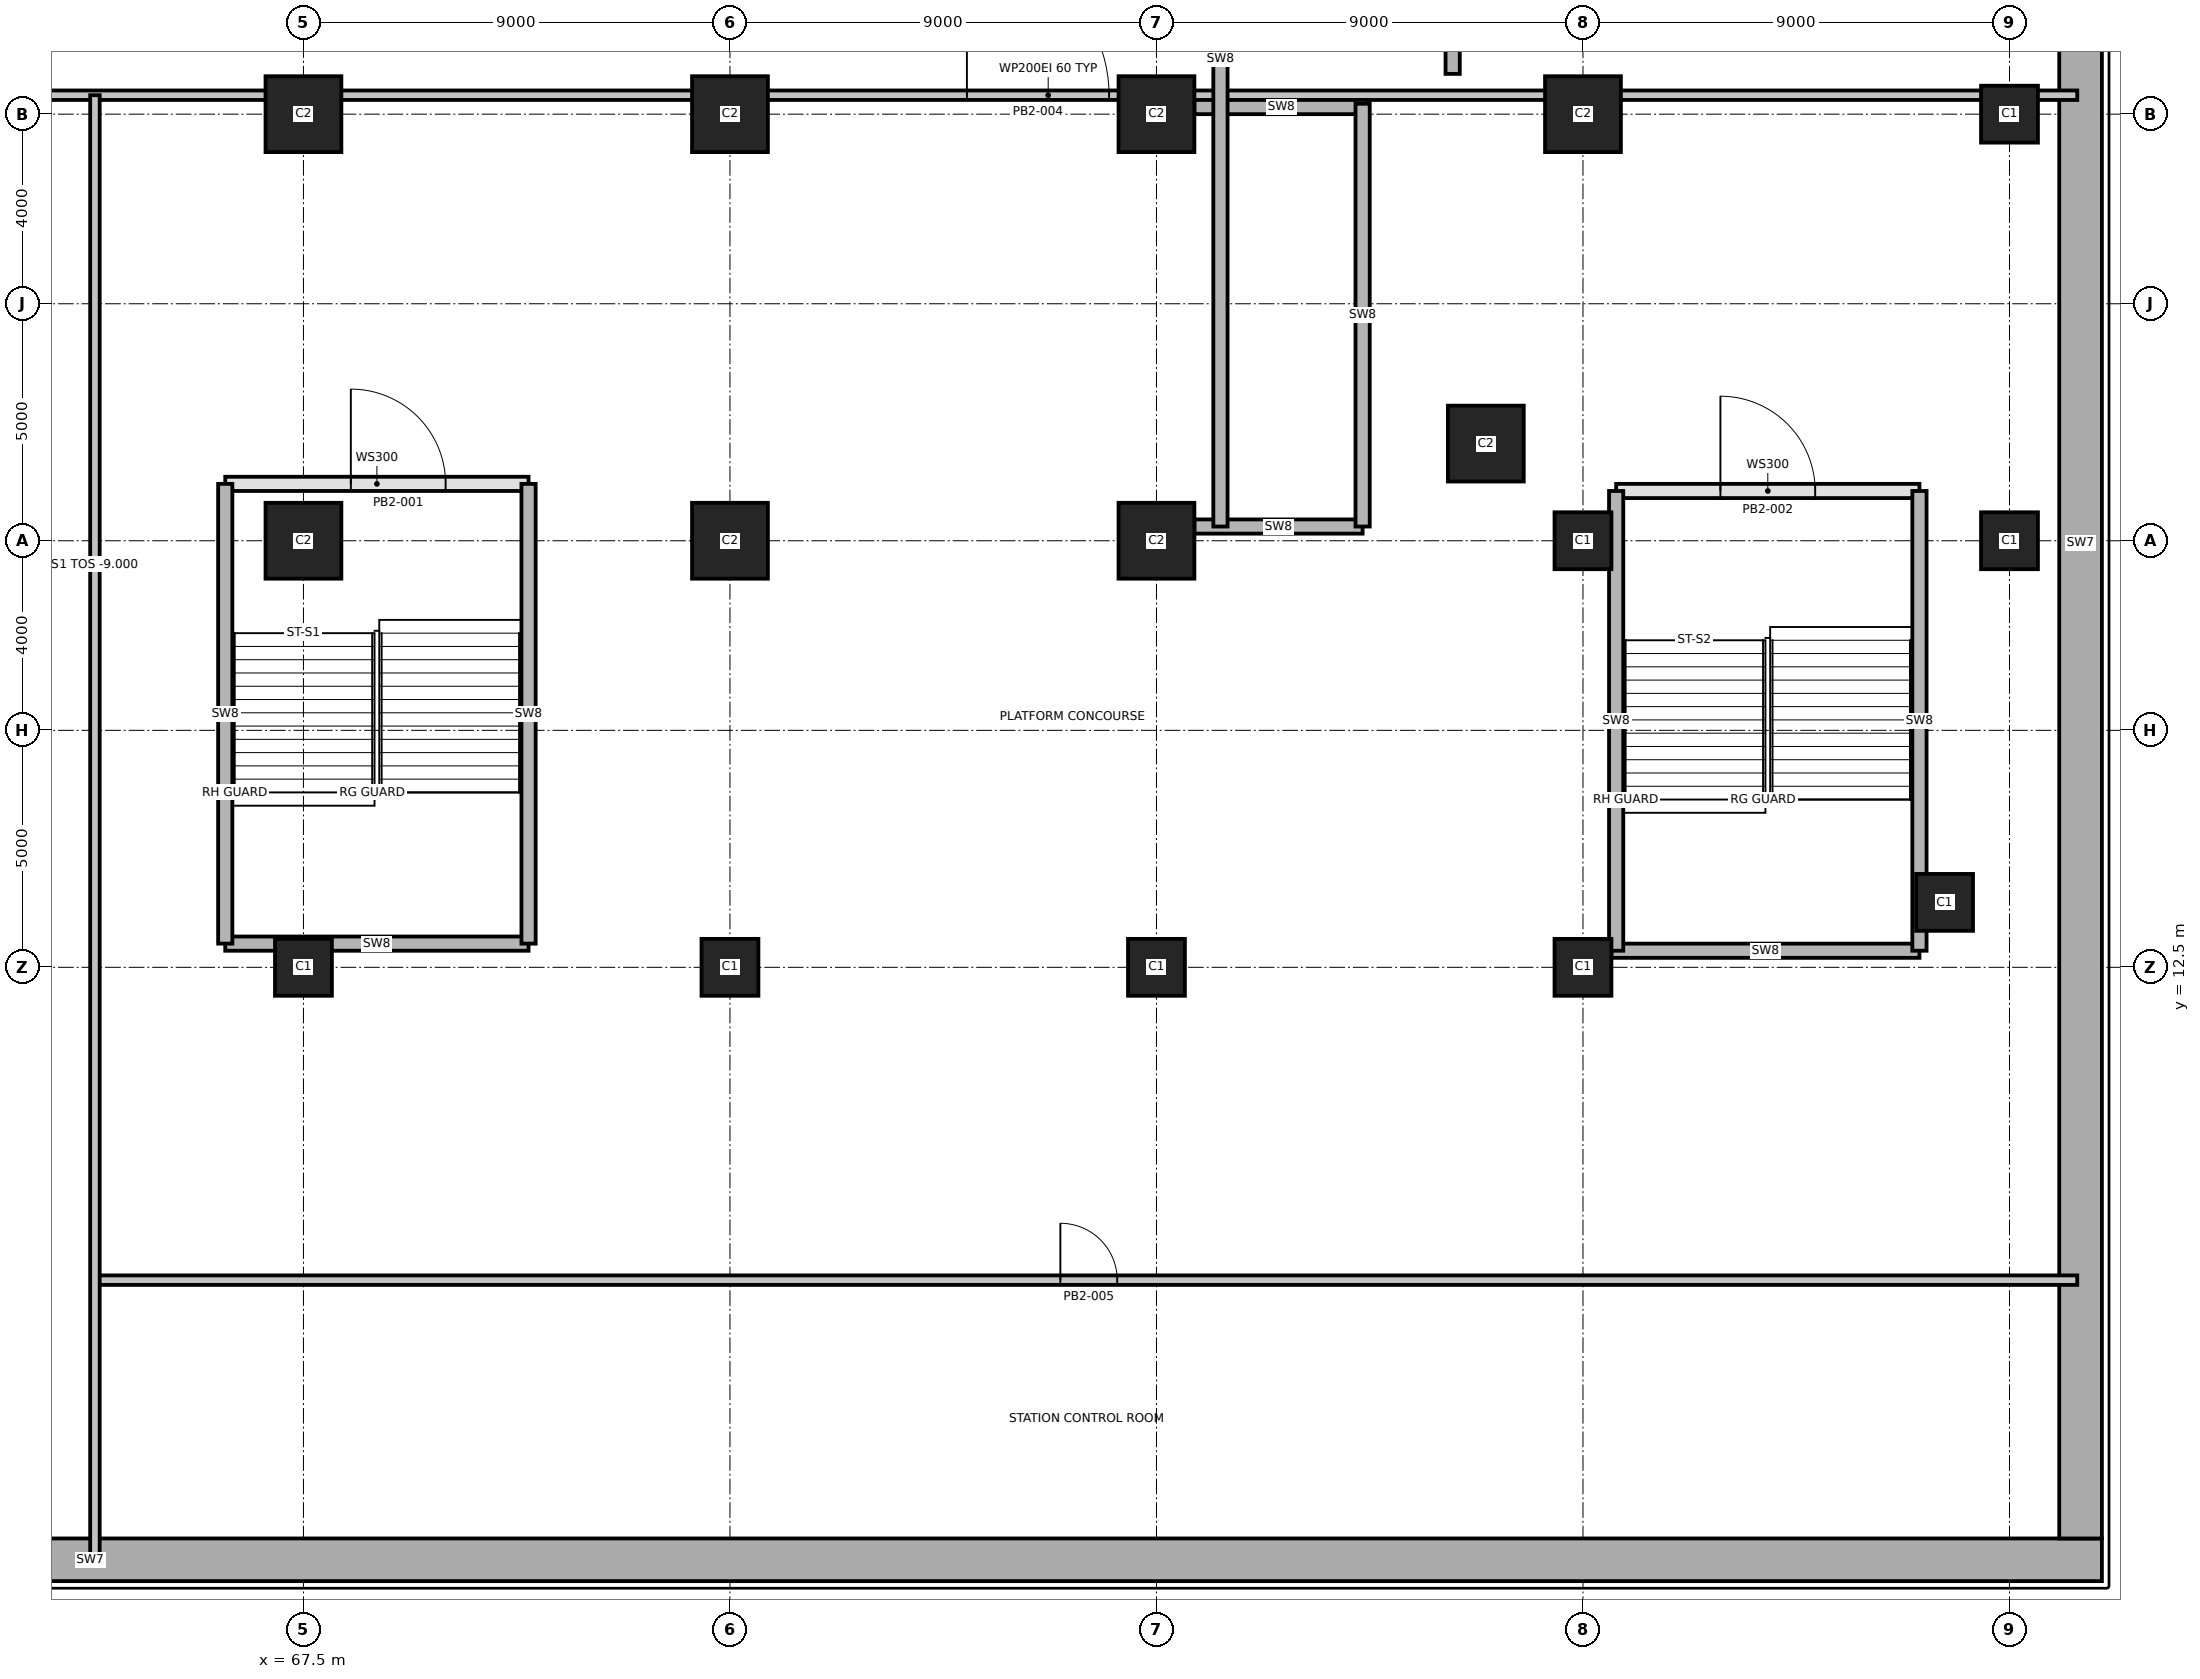
"""IFC4 building model, lengths in metres.
Left out: names, types, materials, properties, quantities, classifications, styles, units other than length and angle.
Written with IfcOpenShell. Run it as: python <this file> out.ifc"""

import sys

from ifc_helpers import new_model, si_unit, direction, frame, frame_2d, origin, origin_2d, place, context, subcontext, project, spatial, rectangle, extrude, element, fill, save


model = new_model("IFC4")
c1 = context("Model", 3, precision=1e-05, world=origin(), true_north=direction((0.0, 1.0)))
c2 = subcontext(c1, "Body", "Model", "MODEL_VIEW")
j1 = project(units=[si_unit("LENGTHUNIT", "METRE"), si_unit("PLANEANGLEUNIT", "RADIAN")], contexts=[c1])
p1 = place(None, origin())
s1 = spatial("IfcSite", under=j1, at=p1, CompositionType="ELEMENT")
p2 = place(p1, origin())
s2 = spatial("IfcBuilding", under=s1, at=p2, CompositionType="ELEMENT")
p3 = place(p2, frame((0.0, 0.0, -9.0)))
s3 = spatial("IfcBuildingStorey", under=s2, at=p3, CompositionType="ELEMENT", Elevation=-9.0)
for number, where, z_axis, x_axis in (
    (1, (67.5, 12.5, 0.0), (0.0, 0.0, 1.0), (1.0, 0.0, 0.0)),
    (2, (76.5, 12.5, 0.0), (0.0, 0.0, 1.0), (1.0, 0.0, 0.0)),
    (3, (85.5, 12.5, 0.0), (0.0, 0.0, 1.0), (1.0, 0.0, 0.0)),
    (4, (94.5, 12.5, 0.0), (0.0, 0.0, 1.0), (1.0, 0.0, 0.0)),
    (5, (102.13, 13.87, 0.0), (0.0, 0.0, 1.0), (1.0, 0.0, 0.0)),
):
    element("IfcColumn", number, at=place(p3, frame(where, z_axis=z_axis, x_axis=x_axis)), inside=s3, PredefinedType="COLUMN", context=c2, shape_type="SweptSolid", body=[
        extrude(rectangle(XDim=1.2, YDim=1.2, at=origin_2d()), origin(), (0.0, 0.0, 1.0), 4.5),
    ])
for number, where, z_axis, x_axis in (
    (6, (67.5, 21.5, 0.0), (0.0, 0.0, 1.0), (1.0, 0.0, 0.0)),
    (7, (76.5, 21.5, 0.0), (0.0, 0.0, 1.0), (1.0, 0.0, 0.0)),
    (8, (85.5, 21.5, 0.0), (0.0, 0.0, 1.0), (1.0, 0.0, 0.0)),
):
    element("IfcColumn", number, at=place(p3, frame(where, z_axis=z_axis, x_axis=x_axis)), inside=s3, PredefinedType="COLUMN", context=c2, shape_type="SweptSolid", body=[
        extrude(rectangle(XDim=1.6, YDim=1.6, at=origin_2d()), origin(), (0.0, 0.0, 1.0), 4.5),
    ])
for number, where, z_axis, x_axis in (
    (9, (94.5, 21.5, 0.0), (0.0, 0.0, 1.0), (1.0, 0.0, 0.0)),
    (10, (103.5, 21.5, 0.0), (0.0, 0.0, 1.0), (1.0, 0.0, 0.0)),
):
    element("IfcColumn", number, at=place(p3, frame(where, z_axis=z_axis, x_axis=x_axis)), inside=s3, PredefinedType="COLUMN", context=c2, shape_type="SweptSolid", body=[
        extrude(rectangle(XDim=1.2, YDim=1.2, at=origin_2d()), origin(), (0.0, 0.0, 1.0), 4.5),
    ])
for number, where, z_axis, x_axis in (
    (11, (67.5, 30.5, 0.0), (0.0, 0.0, 1.0), (1.0, 0.0, 0.0)),
    (12, (76.5, 30.5, 0.0), (0.0, 0.0, 1.0), (1.0, 0.0, 0.0)),
    (13, (85.5, 30.5, 0.0), (0.0, 0.0, 1.0), (1.0, 0.0, 0.0)),
    (14, (94.5, 30.5, 0.0), (0.0, 0.0, 1.0), (1.0, 0.0, 0.0)),
):
    element("IfcColumn", number, at=place(p3, frame(where, z_axis=z_axis, x_axis=x_axis)), inside=s3, PredefinedType="COLUMN", context=c2, shape_type="SweptSolid", body=[
        extrude(rectangle(XDim=1.6, YDim=1.6, at=origin_2d()), origin(), (0.0, 0.0, 1.0), 4.5),
    ])
p4 = place(p3, frame((103.5, 30.5, 0.0), z_axis=(0.0, 0.0, 1.0), x_axis=(1.0, 0.0, 0.0)))
e15 = element("IfcColumn", 15, at=p4, inside=s3, PredefinedType="COLUMN", context=c2, shape_type="SweptSolid", body=[
    extrude(rectangle(XDim=1.2, YDim=1.2, at=origin_2d()), origin(), (0.0, 0.0, 1.0), 4.5),
])
p5 = place(p3, frame((92.45, 23.55, 0.0), z_axis=(0.0, 0.0, 1.0), x_axis=(1.0, 0.0, 0.0)))
e16 = element("IfcColumn", 16, at=p5, inside=s3, PredefinedType="COLUMN", context=c2, shape_type="SweptSolid", body=[
    extrude(rectangle(XDim=1.6, YDim=1.6, at=origin_2d()), origin(), (0.0, 0.0, 1.0), 4.5),
])
p6 = place(p3, frame((20.55, 0.0, 0.0), z_axis=(0.0, 0.0, 1.0), x_axis=(1.0, 0.0, 0.0)))
e17 = element("IfcWall", 17, at=p6, inside=s3, PredefinedType="SOLIDWALL", context=c2, shape_type="SweptSolid", body=[
    extrude(rectangle(XDim=84.9, YDim=0.9, at=frame_2d((42.45, 0.0))), origin(), (0.0, 0.0, 1.0), 4.5),
])
p7 = place(p3, frame((105.0, 0.45, 0.0), z_axis=(0.0, 0.0, 1.0), x_axis=(0.0, 1.0, 0.0)))
e18 = element("IfcWall", 18, at=p7, inside=s3, PredefinedType="SOLIDWALL", context=c2, shape_type="SweptSolid", body=[
    extrude(rectangle(XDim=42.0, YDim=0.9, at=frame_2d((21.0, 0.0))), origin(), (0.0, 0.0, 1.0), 4.5),
])
p8 = place(p3, frame((95.1, 12.85, 0.0), z_axis=(0.0, 0.0, 1.0), x_axis=(1.0, 0.0, 0.0)))
e19 = element("IfcWall", 19, at=p8, inside=s3, PredefinedType="SHEAR", context=c2, shape_type="SweptSolid", body=[
    extrude(rectangle(XDim=6.5, YDim=0.3, at=frame_2d((3.25, 0.0))), origin(), (0.0, 0.0, 1.0), 4.2),
])
p9 = place(p3, frame((65.85, 13.0, 0.0), z_axis=(0.0, 0.0, 1.0), x_axis=(1.0, 0.0, 0.0)))
e20 = element("IfcWall", 20, at=p9, inside=s3, PredefinedType="SHEAR", context=c2, shape_type="SweptSolid", body=[
    extrude(rectangle(XDim=6.4, YDim=0.3, at=frame_2d((3.2, 0.0))), origin(), (0.0, 0.0, 1.0), 4.2),
])
p10 = place(p3, frame((95.2, 22.55, 0.0), z_axis=(0.0, 0.0, 1.0), x_axis=(1.0, 0.0, 0.0)))
e21 = element("IfcWall", 21, at=p10, inside=s3, PredefinedType="SOLIDWALL", context=c2, shape_type="SweptSolid", body=[
    extrude(rectangle(XDim=6.4, YDim=0.3, at=frame_2d((3.2, 0.0))), origin(), (0.0, 0.0, 1.0), 4.2),
])
p11 = place(p10, frame((2.2, 0.0, 0.0)))
e22 = element("IfcOpeningElement", 22, at=p11, cuts=e21, PredefinedType="OPENING", context=c2, shape_type="SweptSolid", body=[
    extrude(rectangle(XDim=2.0, YDim=2.1, at=frame_2d((1.0, 1.05))), frame((0.0, 0.16, 0.0), z_axis=(0.0, -1.0, 0.0), x_axis=(1.0, 0.0, 0.0)), (0.0, 0.0, 1.0), 0.32),
])
p12 = place(p3, frame((65.85, 22.7, 0.0), z_axis=(0.0, 0.0, 1.0), x_axis=(1.0, 0.0, 0.0)))
e23 = element("IfcWall", 23, at=p12, inside=s3, PredefinedType="SOLIDWALL", context=c2, shape_type="SweptSolid", body=[
    extrude(rectangle(XDim=6.4, YDim=0.3, at=frame_2d((3.2, 0.0))), origin(), (0.0, 0.0, 1.0), 4.2),
])
p13 = place(p12, frame((2.65, 0.0, 0.0)))
e24 = element("IfcOpeningElement", 24, at=p13, cuts=e23, PredefinedType="OPENING", context=c2, shape_type="SweptSolid", body=[
    extrude(rectangle(XDim=2.0, YDim=2.1, at=frame_2d((1.0, 1.05))), frame((0.0, 0.16, 0.0), z_axis=(0.0, -1.0, 0.0), x_axis=(1.0, 0.0, 0.0)), (0.0, 0.0, 1.0), 0.32),
])
p14 = place(p3, frame((61.5, 30.9, 0.0), z_axis=(0.0, 0.0, 1.0), x_axis=(1.0, 0.0, 0.0)))
e25 = element("IfcWall", 25, at=p14, inside=s3, PredefinedType="PARTITIONING", context=c2, shape_type="SweptSolid", body=[
    extrude(rectangle(XDim=43.43, YDim=0.2, at=frame_2d((21.715, 0.0))), origin(), (0.0, 0.0, 1.0), 4.2),
])
p15 = place(p14, frame((20.0, 0.0, 0.0)))
e26 = element("IfcOpeningElement", 26, at=p15, cuts=e25, PredefinedType="OPENING", context=c2, shape_type="SweptSolid", body=[
    extrude(rectangle(XDim=3.0, YDim=2.1, at=frame_2d((1.5, 1.05))), frame((0.0, 0.11, 0.0), z_axis=(0.0, -1.0, 0.0), x_axis=(1.0, 0.0, 0.0)), (0.0, 0.0, 1.0), 0.22),
])
p16 = place(p3, frame((63.1, 5.9, 0.0), z_axis=(0.0, 0.0, 1.0), x_axis=(1.0, 0.0, 0.0)))
e27 = element("IfcWall", 27, at=p16, inside=s3, PredefinedType="PARTITIONING", context=c2, shape_type="SweptSolid", body=[
    extrude(rectangle(XDim=41.83, YDim=0.2, at=frame_2d((20.915, 0.0))), origin(), (0.0, 0.0, 1.0), 4.2),
])
p17 = place(p16, frame((20.372, 0.0, 0.0)))
e28 = element("IfcOpeningElement", 28, at=p17, cuts=e27, PredefinedType="OPENING", context=c2, shape_type="SweptSolid", body=[
    extrude(rectangle(XDim=1.2, YDim=2.1, at=frame_2d((0.6, 1.05))), frame((0.0, 0.11, 0.0), z_axis=(0.0, -1.0, 0.0), x_axis=(1.0, 0.0, 0.0)), (0.0, 0.0, 1.0), 0.22),
])
p18 = place(p3, frame((101.6, 12.85, 0.0), z_axis=(0.0, 0.0, 1.0), x_axis=(0.0, 1.0, 0.0)))
e29 = element("IfcWall", 29, at=p18, inside=s3, PredefinedType="SHEAR", context=c2, shape_type="SweptSolid", body=[
    extrude(rectangle(XDim=9.7, YDim=0.3, at=frame_2d((4.85, 0.0))), origin(), (0.0, 0.0, 1.0), 4.2),
])
p19 = place(p3, frame((63.1, 0.07, 0.0), z_axis=(0.0, 0.0, 1.0), x_axis=(0.0, 1.0, 0.0)))
e30 = element("IfcWall", 30, at=p19, inside=s3, PredefinedType="PARTITIONING", context=c2, shape_type="SweptSolid", body=[
    extrude(rectangle(XDim=30.83, YDim=0.2, at=frame_2d((15.415, 0.0))), origin(), (0.0, 0.0, 1.0), 4.2),
])
for number, where, z_axis, x_axis in (
    (31, (65.85, 13.0, 0.0), (0.0, 0.0, 1.0), (0.0, 1.0, 0.0)),
    (32, (72.25, 13.0, 0.0), (0.0, 0.0, 1.0), (0.0, 1.0, 0.0)),
    (33, (95.2, 12.85, 0.0), (0.0, 0.0, 1.0), (0.0, 1.0, 0.0)),
):
    element("IfcWall", number, at=place(p3, frame(where, z_axis=z_axis, x_axis=x_axis)), inside=s3, PredefinedType="SHEAR", context=c2, shape_type="SweptSolid", body=[
        extrude(rectangle(XDim=9.7, YDim=0.3, at=frame_2d((4.85, 0.0))), origin(), (0.0, 0.0, 1.0), 4.2),
    ])
p20 = place(p3, frame((86.3, 21.8, 0.0), z_axis=(0.0, 0.0, 1.0), x_axis=(1.0, 0.0, 0.0)))
e34 = element("IfcWall", 34, at=p20, inside=s3, PredefinedType="SHEAR", context=c2, shape_type="SweptSolid", body=[
    extrude(rectangle(XDim=3.55, YDim=0.3, at=frame_2d((1.775, 0.0))), origin(), (0.0, 0.0, 1.0), 4.2),
])
p21 = place(p3, frame((86.3, 30.65, 0.0), z_axis=(0.0, 0.0, 1.0), x_axis=(1.0, 0.0, 0.0)))
e35 = element("IfcWall", 35, at=p21, inside=s3, PredefinedType="SHEAR", context=c2, shape_type="SweptSolid", body=[
    extrude(rectangle(XDim=3.67, YDim=0.3, at=frame_2d((1.835, 0.0))), origin(), (0.0, 0.0, 1.0), 4.2),
])
p22 = place(p3, frame((86.85, 21.8, 0.0), z_axis=(0.0, 0.0, 1.0), x_axis=(0.0, 1.0, 0.0)))
e36 = element("IfcWall", 36, at=p22, inside=s3, PredefinedType="SHEAR", context=c2, shape_type="SweptSolid", body=[
    extrude(rectangle(XDim=19.73, YDim=0.3, at=frame_2d((9.865, 0.0))), origin(), (0.0, 0.0, 1.0), 4.2),
])
p23 = place(p3, frame((89.85, 21.8, 0.0), z_axis=(0.0, 0.0, 1.0), x_axis=(0.0, 1.0, 0.0)))
e37 = element("IfcWall", 37, at=p23, inside=s3, PredefinedType="SHEAR", context=c2, shape_type="SweptSolid", body=[
    extrude(rectangle(XDim=8.92, YDim=0.3, at=frame_2d((4.46, 0.0))), origin(), (0.0, 0.0, 1.0), 4.2),
])
p24 = place(p3, frame((91.75, 31.35, 0.0), z_axis=(0.0, 0.0, 1.0), x_axis=(0.0, 1.0, 0.0)))
e38 = element("IfcWall", 38, at=p24, inside=s3, PredefinedType="SHEAR", context=c2, shape_type="SweptSolid", body=[
    extrude(rectangle(XDim=10.18, YDim=0.3, at=frame_2d((5.09, 0.0))), origin(), (0.0, 0.0, 1.0), 4.2),
])
p25 = place(p13, origin())
e39 = element("IfcDoor", 39, at=p25, inside=s3, OperationType="SINGLE_SWING_LEFT", PredefinedType="DOOR", context=c2, shape_type="SweptSolid", body=[
    extrude(rectangle(XDim=2.0, YDim=2.1, at=frame_2d((1.0, 1.05))), frame((0.0, 0.025, 0.0), z_axis=(0.0, -1.0, 0.0), x_axis=(1.0, 0.0, 0.0)), (0.0, 0.0, 1.0), 0.05),
])
fill(e24, e39)
p26 = place(p11, origin())
e40 = element("IfcDoor", 40, at=p26, inside=s3, OperationType="SINGLE_SWING_RIGHT", PredefinedType="DOOR", context=c2, shape_type="SweptSolid", body=[
    extrude(rectangle(XDim=2.0, YDim=2.1, at=frame_2d((1.0, 1.05))), frame((0.0, 0.025, 0.0), z_axis=(0.0, -1.0, 0.0), x_axis=(1.0, 0.0, 0.0)), (0.0, 0.0, 1.0), 0.05),
])
fill(e22, e40)
p27 = place(p15, origin())
e41 = element("IfcDoor", 41, at=p27, inside=s3, OperationType="SINGLE_SWING_RIGHT", PredefinedType="DOOR", context=c2, shape_type="SweptSolid", body=[
    extrude(rectangle(XDim=3.0, YDim=2.1, at=frame_2d((1.5, 1.05))), frame((0.0, 0.025, 0.0), z_axis=(0.0, -1.0, 0.0), x_axis=(1.0, 0.0, 0.0)), (0.0, 0.0, 1.0), 0.05),
])
fill(e26, e41)
p28 = place(p17, origin())
e42 = element("IfcDoor", 42, at=p28, inside=s3, OperationType="SINGLE_SWING_LEFT", PredefinedType="DOOR", context=c2, shape_type="SweptSolid", body=[
    extrude(rectangle(XDim=1.2, YDim=2.1, at=frame_2d((0.6, 1.05))), frame((0.0, 0.025, 0.0), z_axis=(0.0, -1.0, 0.0), x_axis=(1.0, 0.0, 0.0)), (0.0, 0.0, 1.0), 0.05),
])
fill(e28, e42)
save(model, sys.argv[1])
